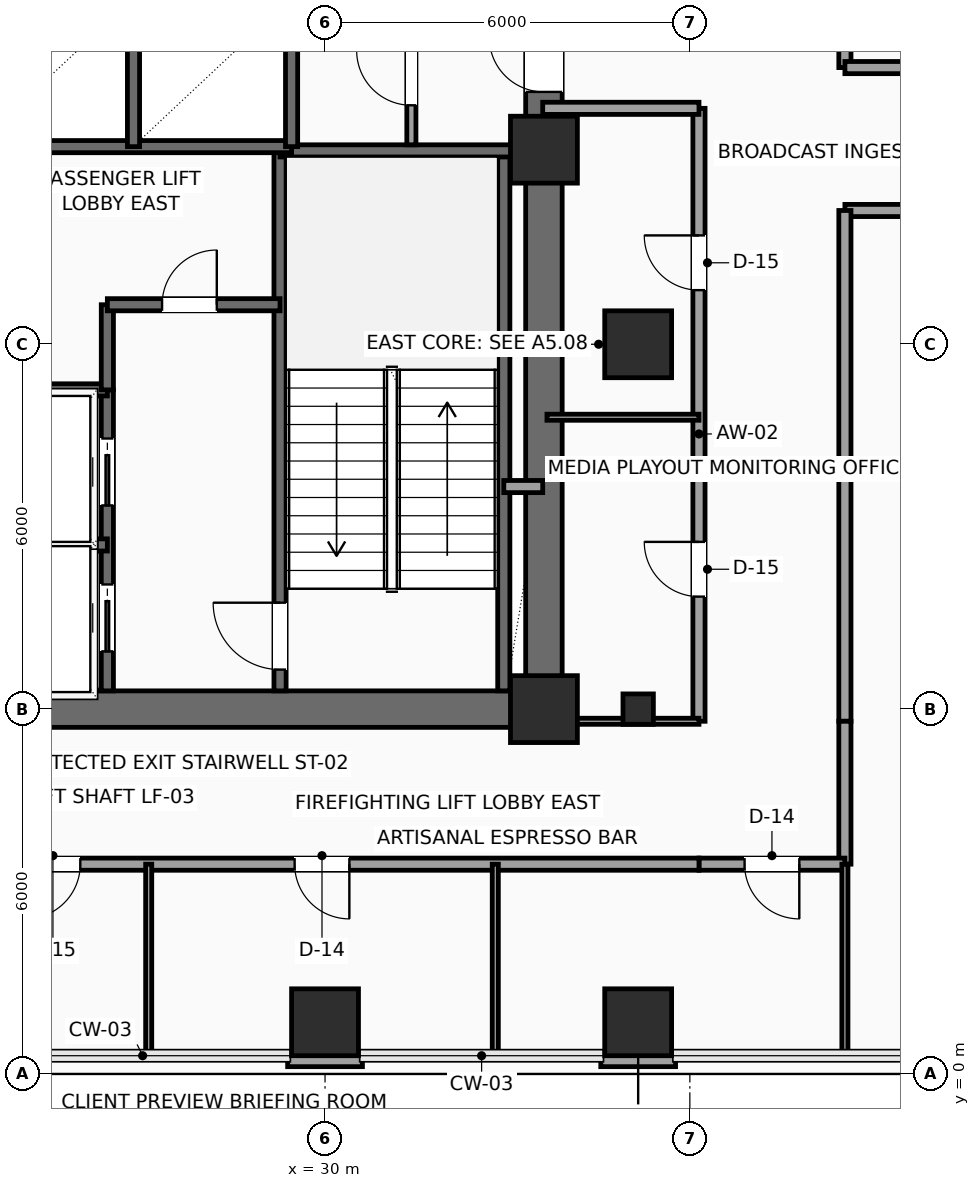
"""IFC4 building model, lengths in metres.
Left out: names, types, materials, properties, quantities, classifications, styles, units other than length and angle.
Written with IfcOpenShell. Run it as: python <this file> out.ifc"""

import sys

from ifc_helpers import new_model, si_unit, direction, frame, frame_2d, origin, origin_2d, place, context, subcontext, project, spatial, rectangle, hollow_rectangle, extrude, element, fill, save


model = new_model("IFC4")
c1 = context("Model", 3, precision=1e-05, world=origin(), true_north=direction((0.0, 1.0)))
c2 = subcontext(c1, "Body", "Model", "MODEL_VIEW")
j1 = project(units=[si_unit("LENGTHUNIT", "METRE"), si_unit("PLANEANGLEUNIT", "RADIAN")], contexts=[c1])
p1 = place(None, origin())
s1 = spatial("IfcSite", under=j1, at=p1, CompositionType="ELEMENT")
p2 = place(p1, origin())
s2 = spatial("IfcBuilding", under=s1, at=p2, CompositionType="ELEMENT")
p3 = place(p2, frame((0.0, 0.0, 145.65)))
s3 = spatial("IfcBuildingStorey", under=s2, at=p3, CompositionType="ELEMENT", Elevation=145.65)
for number, where, z_axis, x_axis in (
    (1, (33.6, 6.0, 0.0), (0.0, 0.0, 1.0), (1.0, 0.0, 0.0)),
    (2, (33.6, 15.2, 0.0), (0.0, 0.0, 1.0), (1.0, 0.0, 0.0)),
    (3, (30.0, 0.85, 0.0), (0.0, 0.0, 1.0), (1.0, 0.0, 0.0)),
    (4, (35.15, 0.85, 0.0), (0.0, 0.0, 1.0), (1.0, 0.0, 0.0)),
):
    element("IfcColumn", number, at=place(p3, frame(where, z_axis=z_axis, x_axis=x_axis)), inside=s3, PredefinedType="COLUMN", context=c2, shape_type="SweptSolid", body=[
        extrude(rectangle(XDim=1.1, YDim=1.1, at=origin_2d()), origin(), (0.0, 0.0, 1.0), 3.75),
    ])
p4 = place(p3, frame((35.15, 6.0, 0.0), z_axis=(0.0, 0.0, 1.0), x_axis=(1.0, 0.0, 0.0)))
e5 = element("IfcColumn", 5, at=p4, inside=s3, PredefinedType="COLUMN", context=c2, shape_type="SweptSolid", body=[
    extrude(hollow_rectangle(XDim=0.5, YDim=0.5, WallThickness=0.025, InnerFilletRadius=0.025, OuterFilletRadius=0.04, at=origin_2d()), origin(), (0.0, 0.0, 1.0), 3.75),
])
p5 = place(p3, frame((35.15, 12.0, 0.0), z_axis=(0.0, 0.0, 1.0), x_axis=(1.0, 0.0, 0.0)))
e6 = element("IfcColumn", 6, at=p5, inside=s3, PredefinedType="COLUMN", context=c2, shape_type="SweptSolid", body=[
    extrude(rectangle(XDim=1.1, YDim=1.1, at=origin_2d()), origin(), (0.0, 0.0, 1.0), 3.75),
])
for number, where, z_axis, x_axis in (
    (7, (35.765, 0.24, 0.0), (0.0, 0.0, 1.0), (-1.0, 0.0, 0.0)),
    (8, (30.615, 0.24, 0.0), (0.0, 0.0, 1.0), (-1.0, 0.0, 0.0)),
):
    element("IfcWall", number, at=place(p3, frame(where, z_axis=z_axis, x_axis=x_axis)), inside=s3, PredefinedType="SOLIDWALL", context=c2, shape_type="SweptSolid", body=[
        extrude(rectangle(XDim=1.23, YDim=0.24, at=frame_2d((0.615, 0.0))), origin(), (0.0, 0.0, 1.0), 3.525),
    ])
p6 = place(p3, frame((24.0, 6.0, 0.0), z_axis=(0.0, 0.0, 1.0), x_axis=(1.0, 0.0, 0.0)))
e9 = element("IfcWall", 9, at=p6, inside=s3, PredefinedType="SHEAR", context=c2, shape_type="SweptSolid", body=[
    extrude(rectangle(XDim=9.6, YDim=0.6, at=frame_2d((4.8, 0.0))), origin(), (0.0, 0.0, 1.0), 3.525),
])
p7 = place(p3, frame((33.6, 6.0, 0.0), z_axis=(0.0, 0.0, 1.0), x_axis=(0.0, 1.0, 0.0)))
e10 = element("IfcWall", 10, at=p7, inside=s3, PredefinedType="SHEAR", context=c2, shape_type="SweptSolid", body=[
    extrude(rectangle(XDim=12.0, YDim=0.6, at=frame_2d((6.0, 0.0))), origin(), (0.0, 0.0, 1.0), 3.525),
])
p8 = place(p7, frame((10.15, 0.0, 0.0)))
e11 = element("IfcOpeningElement", 11, at=p8, cuts=e10, PredefinedType="OPENING", context=c2, shape_type="SweptSolid", body=[
    extrude(rectangle(XDim=0.9, YDim=2.15, at=frame_2d((0.45, 1.075))), frame((0.0, 0.31, 0.0), z_axis=(0.0, -1.0, 0.0), x_axis=(1.0, 0.0, 0.0)), (0.0, 0.0, 1.0), 0.62),
])
p9 = place(p3, frame((29.26, 6.3, 0.0), z_axis=(0.0, 0.0, 1.0), x_axis=(0.0, 1.0, 0.0)))
e12 = element("IfcWall", 12, at=p9, inside=s3, PredefinedType="SHEAR", context=c2, shape_type="SweptSolid", body=[
    extrude(rectangle(XDim=8.88, YDim=0.2, at=frame_2d((4.44, 0.0))), origin(), (0.0, 0.0, 1.0), 3.525),
])
p10 = place(p9, frame((0.35, 0.0, 0.0)))
e13 = element("IfcOpeningElement", 13, at=p10, cuts=e12, PredefinedType="OPENING", context=c2, shape_type="SweptSolid", body=[
    extrude(rectangle(XDim=1.1, YDim=2.2, at=frame_2d((0.55, 1.1))), frame((0.0, 0.11, 0.0), z_axis=(0.0, -1.0, 0.0), x_axis=(1.0, 0.0, 0.0)), (0.0, 0.0, 1.0), 0.22),
])
p11 = place(p3, frame((32.94, 6.3, 0.0), z_axis=(0.0, 0.0, 1.0), x_axis=(0.0, 1.0, 0.0)))
e14 = element("IfcWall", 14, at=p11, inside=s3, PredefinedType="SHEAR", context=c2, shape_type="SweptSolid", body=[
    extrude(rectangle(XDim=8.88, YDim=0.2, at=frame_2d((4.44, 0.0))), origin(), (0.0, 0.0, 1.0), 3.525),
])
p12 = place(p3, frame((29.26, 15.18, 0.0), z_axis=(0.0, 0.0, 1.0), x_axis=(1.0, 0.0, 0.0)))
e15 = element("IfcWall", 15, at=p12, inside=s3, PredefinedType="SHEAR", context=c2, shape_type="SweptSolid", body=[
    extrude(rectangle(XDim=4.04, YDim=0.2, at=frame_2d((2.02, 0.0))), origin(), (0.0, 0.0, 1.0), 3.525),
])
p13 = place(p3, frame((26.42, 6.3, 0.0), z_axis=(0.0, 0.0, 1.0), x_axis=(0.0, 1.0, 0.0)))
e16 = element("IfcWall", 16, at=p13, inside=s3, PredefinedType="SHEAR", context=c2, shape_type="SweptSolid", body=[
    extrude(rectangle(XDim=4.95, YDim=0.2, at=frame_2d((2.475, 0.0))), origin(), (0.0, 0.0, 1.0), 3.525),
])
p14 = place(p13, frame((0.65, 0.0, 0.0)))
e17 = element("IfcOpeningElement", 17, at=p14, cuts=e16, PredefinedType="OPENING", context=c2, shape_type="SweptSolid", body=[
    extrude(rectangle(XDim=1.1, YDim=2.2, at=frame_2d((0.55, 1.1))), frame((0.0, 0.11, 0.0), z_axis=(0.0, -1.0, 0.0), x_axis=(1.0, 0.0, 0.0)), (0.0, 0.0, 1.0), 0.22),
])
p15 = place(p13, frame((3.05, 0.0, 0.0)))
e18 = element("IfcOpeningElement", 18, at=p15, cuts=e16, PredefinedType="OPENING", context=c2, shape_type="SweptSolid", body=[
    extrude(rectangle(XDim=1.1, YDim=2.2, at=frame_2d((0.55, 1.1))), frame((0.0, 0.11, 0.0), z_axis=(0.0, -1.0, 0.0), x_axis=(1.0, 0.0, 0.0)), (0.0, 0.0, 1.0), 0.22),
])
for number, where, z_axis, x_axis in (
    (19, (24.25, 8.7, 0.0), (0.0, 0.0, 1.0), (1.0, 0.0, 0.0)),
    (20, (24.25, 11.25, 0.0), (0.0, 0.0, 1.0), (1.0, 0.0, 0.0)),
):
    element("IfcWall", number, at=place(p3, frame(where, z_axis=z_axis, x_axis=x_axis)), inside=s3, PredefinedType="SHEAR", context=c2, shape_type="SweptSolid", body=[
        extrude(rectangle(XDim=2.17, YDim=0.2, at=frame_2d((1.085, 0.0))), origin(), (0.0, 0.0, 1.0), 3.525),
    ])
p16 = place(p3, frame((26.42, 11.25, 0.0), z_axis=(0.0, 0.0, 1.0), x_axis=(0.0, 1.0, 0.0)))
e21 = element("IfcWall", 21, at=p16, inside=s3, PredefinedType="SHEAR", context=c2, shape_type="SweptSolid", body=[
    extrude(rectangle(XDim=1.4, YDim=0.2, at=frame_2d((0.7, 0.0))), origin(), (0.0, 0.0, 1.0), 3.525),
])
p17 = place(p3, frame((26.42, 12.65, 0.0), z_axis=(0.0, 0.0, 1.0), x_axis=(1.0, 0.0, 0.0)))
e22 = element("IfcWall", 22, at=p17, inside=s3, PredefinedType="SHEAR", context=c2, shape_type="SweptSolid", body=[
    extrude(rectangle(XDim=2.84, YDim=0.2, at=frame_2d((1.42, 0.0))), origin(), (0.0, 0.0, 1.0), 3.525),
])
p18 = place(p17, frame((0.9, 0.0, 0.0)))
e23 = element("IfcOpeningElement", 23, at=p18, cuts=e22, PredefinedType="OPENING", context=c2, shape_type="SweptSolid", body=[
    extrude(rectangle(XDim=0.9, YDim=2.15, at=frame_2d((0.45, 1.075))), frame((0.0, 0.11, 0.0), z_axis=(0.0, -1.0, 0.0), x_axis=(1.0, 0.0, 0.0)), (0.0, 0.0, 1.0), 0.22),
])
p19 = place(p3, frame((32.94, 9.66, 0.0), z_axis=(0.0, 0.0, 1.0), x_axis=(1.0, 0.0, 0.0)))
e24 = element("IfcWall", 24, at=p19, inside=s3, PredefinedType="SOLIDWALL", context=c2, shape_type="SweptSolid", body=[
    extrude(rectangle(XDim=0.64, YDim=0.2, at=frame_2d((0.32, 0.0))), origin(), (0.0, 0.0, 1.0), 3.525),
])
p20 = place(p3, frame((24.25, 15.25, 0.0), z_axis=(0.0, 0.0, 1.0), x_axis=(1.0, 0.0, 0.0)))
e25 = element("IfcWall", 25, at=p20, inside=s3, PredefinedType="SHEAR", context=c2, shape_type="SweptSolid", body=[
    extrude(rectangle(XDim=5.2, YDim=0.2, at=frame_2d((2.6, 0.0))), origin(), (0.0, 0.0, 1.0), 3.525),
])
p21 = place(p3, frame((26.85, 15.25, 0.0), z_axis=(0.0, 0.0, 1.0), x_axis=(0.0, 1.0, 0.0)))
e26 = element("IfcWall", 26, at=p21, inside=s3, PredefinedType="SHEAR", context=c2, shape_type="SweptSolid", body=[
    extrude(rectangle(XDim=2.4, YDim=0.2, at=frame_2d((1.2, 0.0))), origin(), (0.0, 0.0, 1.0), 3.525),
])
p22 = place(p3, frame((29.45, 15.25, 0.0), z_axis=(0.0, 0.0, 1.0), x_axis=(0.0, 1.0, 0.0)))
e27 = element("IfcWall", 27, at=p22, inside=s3, PredefinedType="SHEAR", context=c2, shape_type="SweptSolid", body=[
    extrude(rectangle(XDim=2.45, YDim=0.2, at=frame_2d((1.225, 0.0))), origin(), (0.0, 0.0, 1.0), 3.525),
])
p23 = place(p3, frame((31.42, 15.28, 0.0), z_axis=(0.0, 0.0, 1.0), x_axis=(0.0, 1.0, 0.0)))
e28 = element("IfcWall", 28, at=p23, inside=s3, PredefinedType="PARTITIONING", context=c2, shape_type="SweptSolid", body=[
    extrude(rectangle(XDim=2.42, YDim=0.15, at=frame_2d((1.21, 0.0))), origin(), (0.0, 0.0, 1.0), 3.525),
])
p24 = place(p23, frame((0.65, 0.0, 0.0)))
e29 = element("IfcOpeningElement", 29, at=p24, cuts=e28, PredefinedType="OPENING", context=c2, shape_type="SweptSolid", body=[
    extrude(rectangle(XDim=0.9, YDim=2.15, at=frame_2d((0.45, 1.075))), frame((0.0, 0.085, 0.0), z_axis=(0.0, -1.0, 0.0), x_axis=(1.0, 0.0, 0.0)), (0.0, 0.0, 1.0), 0.17),
])
p25 = place(p3, frame((36.15, 5.8, 0.0), z_axis=(0.0, 0.0, 1.0), x_axis=(0.0, 1.0, 0.0)))
e30 = element("IfcWall", 30, at=p25, inside=s3, PredefinedType="PARTITIONING", context=c2, shape_type="SweptSolid", body=[
    extrude(rectangle(XDim=10.08, YDim=0.2, at=frame_2d((5.04, 0.0))), origin(), (0.0, 0.0, 1.0), 3.525),
])
p26 = place(p25, frame((2.05, 0.0, 0.0)))
e31 = element("IfcOpeningElement", 31, at=p26, cuts=e30, PredefinedType="OPENING", context=c2, shape_type="SweptSolid", body=[
    extrude(rectangle(XDim=0.9, YDim=2.1, at=frame_2d((0.45, 1.05))), frame((0.0, 0.11, 0.0), z_axis=(0.0, -1.0, 0.0), x_axis=(1.0, 0.0, 0.0)), (0.0, 0.0, 1.0), 0.22),
])
p27 = place(p25, frame((7.09, 0.0, 0.0)))
e32 = element("IfcOpeningElement", 32, at=p27, cuts=e30, PredefinedType="OPENING", context=c2, shape_type="SweptSolid", body=[
    extrude(rectangle(XDim=0.9, YDim=2.1, at=frame_2d((0.45, 1.05))), frame((0.0, 0.11, 0.0), z_axis=(0.0, -1.0, 0.0), x_axis=(1.0, 0.0, 0.0)), (0.0, 0.0, 1.0), 0.22),
])
p28 = place(p3, frame((36.15, 15.88, 0.0), z_axis=(0.0, 0.0, 1.0), x_axis=(-1.0, 0.0, 0.0)))
e33 = element("IfcWall", 33, at=p28, inside=s3, PredefinedType="PARTITIONING", context=c2, shape_type="SweptSolid", body=[
    extrude(rectangle(XDim=2.57, YDim=0.2, at=frame_2d((1.285, 0.0))), origin(), (0.0, 0.0, 1.0), 3.525),
])
p29 = place(p3, frame((38.55, 23.7, 0.0), z_axis=(0.0, 0.0, 1.0), x_axis=(0.0, -1.0, 0.0)))
e34 = element("IfcWall", 34, at=p29, inside=s3, PredefinedType="PARTITIONING", context=c2, shape_type="SweptSolid", body=[
    extrude(rectangle(XDim=7.15, YDim=0.2, at=frame_2d((3.575, 0.0))), origin(), (0.0, 0.0, 1.0), 3.525),
])
p30 = place(p3, frame((38.55, 16.55, 0.0), z_axis=(0.0, 0.0, 1.0), x_axis=(1.0, 0.0, 0.0)))
e35 = element("IfcWall", 35, at=p30, inside=s3, PredefinedType="PARTITIONING", context=c2, shape_type="SweptSolid", body=[
    extrude(rectangle(XDim=9.15, YDim=0.2, at=frame_2d((4.575, 0.0))), origin(), (0.0, 0.0, 1.0), 3.525),
])
p31 = place(p30, frame((1.23, 0.0, 0.0)))
e36 = element("IfcOpeningElement", 36, at=p31, cuts=e35, PredefinedType="OPENING", context=c2, shape_type="SweptSolid", body=[
    extrude(rectangle(XDim=0.9, YDim=2.1, at=frame_2d((0.45, 1.05))), frame((0.0, 0.11, 0.0), z_axis=(0.0, -1.0, 0.0), x_axis=(1.0, 0.0, 0.0)), (0.0, 0.0, 1.0), 0.22),
])
p32 = place(p30, frame((6.125, 0.0, 0.0)))
e37 = element("IfcOpeningElement", 37, at=p32, cuts=e35, PredefinedType="OPENING", context=c2, shape_type="SweptSolid", body=[
    extrude(rectangle(XDim=0.9, YDim=2.1, at=frame_2d((0.45, 1.05))), frame((0.0, 0.11, 0.0), z_axis=(0.0, -1.0, 0.0), x_axis=(1.0, 0.0, 0.0)), (0.0, 0.0, 1.0), 0.22),
])
p33 = place(p3, frame((47.7, 14.2, 0.0), z_axis=(0.0, 0.0, 1.0), x_axis=(-1.0, 0.0, 0.0)))
e38 = element("IfcWall", 38, at=p33, inside=s3, PredefinedType="PARTITIONING", context=c2, shape_type="SweptSolid", body=[
    extrude(rectangle(XDim=9.15, YDim=0.2, at=frame_2d((4.575, 0.0))), origin(), (0.0, 0.0, 1.0), 3.525),
])
p34 = place(p33, frame((6.675, 0.0, 0.0)))
e39 = element("IfcOpeningElement", 39, at=p34, cuts=e38, PredefinedType="OPENING", context=c2, shape_type="SweptSolid", body=[
    extrude(rectangle(XDim=0.9, YDim=2.1, at=frame_2d((0.45, 1.05))), frame((0.0, 0.11, 0.0), z_axis=(0.0, -1.0, 0.0), x_axis=(1.0, 0.0, 0.0)), (0.0, 0.0, 1.0), 0.22),
])
p35 = place(p33, frame((2.125, 0.0, 0.0)))
e40 = element("IfcOpeningElement", 40, at=p35, cuts=e38, PredefinedType="OPENING", context=c2, shape_type="SweptSolid", body=[
    extrude(rectangle(XDim=0.9, YDim=2.1, at=frame_2d((0.45, 1.05))), frame((0.0, 0.11, 0.0), z_axis=(0.0, -1.0, 0.0), x_axis=(1.0, 0.0, 0.0)), (0.0, 0.0, 1.0), 0.22),
])
p36 = place(p3, frame((38.55, 14.2, 0.0), z_axis=(0.0, 0.0, 1.0), x_axis=(0.0, -1.0, 0.0)))
e41 = element("IfcWall", 41, at=p36, inside=s3, PredefinedType="PARTITIONING", context=c2, shape_type="SweptSolid", body=[
    extrude(rectangle(XDim=8.4, YDim=0.2, at=frame_2d((4.2, 0.0))), origin(), (0.0, 0.0, 1.0), 3.525),
])
p37 = place(p3, frame((38.55, 5.8, 0.0), z_axis=(0.0, 0.0, 1.0), x_axis=(0.0, -1.0, 0.0)))
e42 = element("IfcWall", 42, at=p37, inside=s3, PredefinedType="PARTITIONING", context=c2, shape_type="SweptSolid", body=[
    extrude(rectangle(XDim=2.35, YDim=0.2, at=frame_2d((1.175, 0.0))), origin(), (0.0, 0.0, 1.0), 3.525),
])
p38 = place(p3, frame((38.55, 3.45, 0.0), z_axis=(0.0, 0.0, 1.0), x_axis=(-1.0, 0.0, 0.0)))
e43 = element("IfcWall", 43, at=p38, inside=s3, PredefinedType="PARTITIONING", context=c2, shape_type="SweptSolid", body=[
    extrude(rectangle(XDim=2.4, YDim=0.2, at=frame_2d((1.2, 0.0))), origin(), (0.0, 0.0, 1.0), 3.067),
])
p39 = place(p38, frame((0.75, 0.0, 0.0)))
e44 = element("IfcOpeningElement", 44, at=p39, cuts=e43, PredefinedType="OPENING", context=c2, shape_type="SweptSolid", body=[
    extrude(rectangle(XDim=0.9, YDim=2.1, at=frame_2d((0.45, 1.05))), frame((0.0, 0.11, 0.0), z_axis=(0.0, -1.0, 0.0), x_axis=(1.0, 0.0, 0.0)), (0.0, 0.0, 1.0), 0.22),
])
p40 = place(p3, frame((36.15, 3.45, 0.0), z_axis=(0.0, 0.0, 1.0), x_axis=(-1.0, 0.0, 0.0)))
e45 = element("IfcWall", 45, at=p40, inside=s3, PredefinedType="PARTITIONING", context=c2, shape_type="SweptSolid", body=[
    extrude(rectangle(XDim=12.2, YDim=0.2, at=frame_2d((6.1, 0.0))), origin(), (0.0, 0.0, 1.0), 3.067),
])
p41 = place(p40, frame((10.175, 0.0, 0.0)))
e46 = element("IfcOpeningElement", 46, at=p41, cuts=e45, PredefinedType="OPENING", context=c2, shape_type="SweptSolid", body=[
    extrude(rectangle(XDim=0.9, YDim=2.1, at=frame_2d((0.45, 1.05))), frame((0.0, 0.11, 0.0), z_axis=(0.0, -1.0, 0.0), x_axis=(1.0, 0.0, 0.0)), (0.0, 0.0, 1.0), 0.22),
])
p42 = place(p40, frame((5.75, 0.0, 0.0)))
e47 = element("IfcOpeningElement", 47, at=p42, cuts=e45, PredefinedType="OPENING", context=c2, shape_type="SweptSolid", body=[
    extrude(rectangle(XDim=0.9, YDim=2.1, at=frame_2d((0.45, 1.05))), frame((0.0, 0.11, 0.0), z_axis=(0.0, -1.0, 0.0), x_axis=(1.0, 0.0, 0.0)), (0.0, 0.0, 1.0), 0.22),
])
for number, where, z_axis, x_axis in (
    (48, (27.1, 0.3, 0.0), (0.0, 0.0, 1.0), (0.0, 1.0, 0.0)),
    (49, (32.8, 0.3, 0.0), (0.0, 0.0, 1.0), (0.0, 1.0, 0.0)),
    (50, (38.55, 0.3, 0.0), (0.0, 0.0, 1.0), (0.0, 1.0, 0.0)),
):
    element("IfcWall", number, at=place(p3, frame(where, z_axis=z_axis, x_axis=x_axis)), inside=s3, PredefinedType="PARTITIONING", context=c2, shape_type="SweptSolid", body=[
        extrude(rectangle(XDim=3.15, YDim=0.1, at=frame_2d((1.575, 0.0))), origin(), (0.0, 0.0, 1.0), 3.525),
    ])
p43 = place(p3, frame((33.65, 5.8, 0.0), z_axis=(0.0, 0.0, 1.0), x_axis=(1.0, 0.0, 0.0)))
e51 = element("IfcWall", 51, at=p43, inside=s3, PredefinedType="PARTITIONING", context=c2, shape_type="SweptSolid", body=[
    extrude(rectangle(XDim=2.5, YDim=0.1, at=frame_2d((1.25, 0.0))), origin(), (0.0, 0.0, 1.0), 3.017),
])
p44 = place(p3, frame((33.65, 10.8, 0.0), z_axis=(0.0, 0.0, 1.0), x_axis=(1.0, 0.0, 0.0)))
e52 = element("IfcWall", 52, at=p44, inside=s3, PredefinedType="PARTITIONING", context=c2, shape_type="SweptSolid", body=[
    extrude(rectangle(XDim=2.5, YDim=0.1, at=frame_2d((1.25, 0.0))), origin(), (0.0, 0.0, 1.0), 3.525),
])
p45 = place(p8, origin())
e53 = element("IfcDoor", 53, at=p45, inside=s3, OperationType="SINGLE_SWING_RIGHT", PredefinedType="DOOR", context=c2, shape_type="SweptSolid", body=[
    extrude(rectangle(XDim=0.9, YDim=2.15, at=frame_2d((0.45, 1.075))), frame((0.0, 0.025, 0.0), z_axis=(0.0, -1.0, 0.0), x_axis=(1.0, 0.0, 0.0)), (0.0, 0.0, 1.0), 0.05),
])
fill(e11, e53)
p46 = place(p10, origin())
e54 = element("IfcDoor", 54, at=p46, inside=s3, OperationType="SINGLE_SWING_RIGHT", PredefinedType="DOOR", context=c2, shape_type="SweptSolid", body=[
    extrude(rectangle(XDim=1.1, YDim=2.2, at=frame_2d((0.55, 1.1))), frame((0.0, 0.025, 0.0), z_axis=(0.0, -1.0, 0.0), x_axis=(1.0, 0.0, 0.0)), (0.0, 0.0, 1.0), 0.05),
])
fill(e13, e54)
p47 = place(p14, origin())
e55 = element("IfcDoor", 55, at=p47, inside=s3, OperationType="SLIDING_TO_LEFT", PredefinedType="DOOR", context=c2, shape_type="SweptSolid", body=[
    extrude(rectangle(XDim=1.1, YDim=2.2, at=frame_2d((0.55, 1.1))), frame((0.0, 0.025, 0.0), z_axis=(0.0, -1.0, 0.0), x_axis=(1.0, 0.0, 0.0)), (0.0, 0.0, 1.0), 0.05),
])
fill(e17, e55)
p48 = place(p15, origin())
e56 = element("IfcDoor", 56, at=p48, inside=s3, OperationType="SLIDING_TO_LEFT", PredefinedType="DOOR", context=c2, shape_type="SweptSolid", body=[
    extrude(rectangle(XDim=1.1, YDim=2.2, at=frame_2d((0.55, 1.1))), frame((0.0, 0.025, 0.0), z_axis=(0.0, -1.0, 0.0), x_axis=(1.0, 0.0, 0.0)), (0.0, 0.0, 1.0), 0.05),
])
fill(e18, e56)
p49 = place(p18, origin())
e57 = element("IfcDoor", 57, at=p49, inside=s3, OperationType="SINGLE_SWING_RIGHT", PredefinedType="DOOR", context=c2, shape_type="SweptSolid", body=[
    extrude(rectangle(XDim=0.9, YDim=2.15, at=frame_2d((0.45, 1.075))), frame((0.0, 0.025, 0.0), z_axis=(0.0, -1.0, 0.0), x_axis=(1.0, 0.0, 0.0)), (0.0, 0.0, 1.0), 0.05),
])
fill(e23, e57)
p50 = place(p24, origin())
e58 = element("IfcDoor", 58, at=p50, inside=s3, OperationType="SINGLE_SWING_RIGHT", PredefinedType="DOOR", context=c2, shape_type="SweptSolid", body=[
    extrude(rectangle(XDim=0.9, YDim=2.15, at=frame_2d((0.45, 1.075))), frame((0.0, 0.025, 0.0), z_axis=(0.0, -1.0, 0.0), x_axis=(1.0, 0.0, 0.0)), (0.0, 0.0, 1.0), 0.05),
])
fill(e29, e58)
p51 = place(p26, origin())
e59 = element("IfcDoor", 59, at=p51, inside=s3, OperationType="SINGLE_SWING_RIGHT", PredefinedType="DOOR", context=c2, shape_type="SweptSolid", body=[
    extrude(rectangle(XDim=0.9, YDim=2.1, at=frame_2d((0.45, 1.05))), frame((0.0, 0.025, 0.0), z_axis=(0.0, -1.0, 0.0), x_axis=(1.0, 0.0, 0.0)), (0.0, 0.0, 1.0), 0.05),
])
fill(e31, e59)
p52 = place(p27, origin())
e60 = element("IfcDoor", 60, at=p52, inside=s3, OperationType="SINGLE_SWING_RIGHT", PredefinedType="DOOR", context=c2, shape_type="SweptSolid", body=[
    extrude(rectangle(XDim=0.9, YDim=2.1, at=frame_2d((0.45, 1.05))), frame((0.0, 0.025, 0.0), z_axis=(0.0, -1.0, 0.0), x_axis=(1.0, 0.0, 0.0)), (0.0, 0.0, 1.0), 0.05),
])
fill(e32, e60)
p53 = place(p39, origin())
e61 = element("IfcDoor", 61, at=p53, inside=s3, OperationType="SINGLE_SWING_LEFT", PredefinedType="DOOR", context=c2, shape_type="SweptSolid", body=[
    extrude(rectangle(XDim=0.9, YDim=2.1, at=frame_2d((0.45, 1.05))), frame((0.0, 0.025, 0.0), z_axis=(0.0, -1.0, 0.0), x_axis=(1.0, 0.0, 0.0)), (0.0, 0.0, 1.0), 0.05),
])
fill(e44, e61)
p54 = place(p41, origin())
e62 = element("IfcDoor", 62, at=p54, inside=s3, OperationType="SINGLE_SWING_RIGHT", PredefinedType="DOOR", context=c2, shape_type="SweptSolid", body=[
    extrude(rectangle(XDim=0.9, YDim=2.1, at=frame_2d((0.45, 1.05))), frame((0.0, 0.025, 0.0), z_axis=(0.0, -1.0, 0.0), x_axis=(1.0, 0.0, 0.0)), (0.0, 0.0, 1.0), 0.05),
])
fill(e46, e62)
p55 = place(p42, origin())
e63 = element("IfcDoor", 63, at=p55, inside=s3, OperationType="SINGLE_SWING_LEFT", PredefinedType="DOOR", context=c2, shape_type="SweptSolid", body=[
    extrude(rectangle(XDim=0.9, YDim=2.1, at=frame_2d((0.45, 1.05))), frame((0.0, 0.025, 0.0), z_axis=(0.0, -1.0, 0.0), x_axis=(1.0, 0.0, 0.0)), (0.0, 0.0, 1.0), 0.05),
])
fill(e47, e63)
save(model, sys.argv[1])
